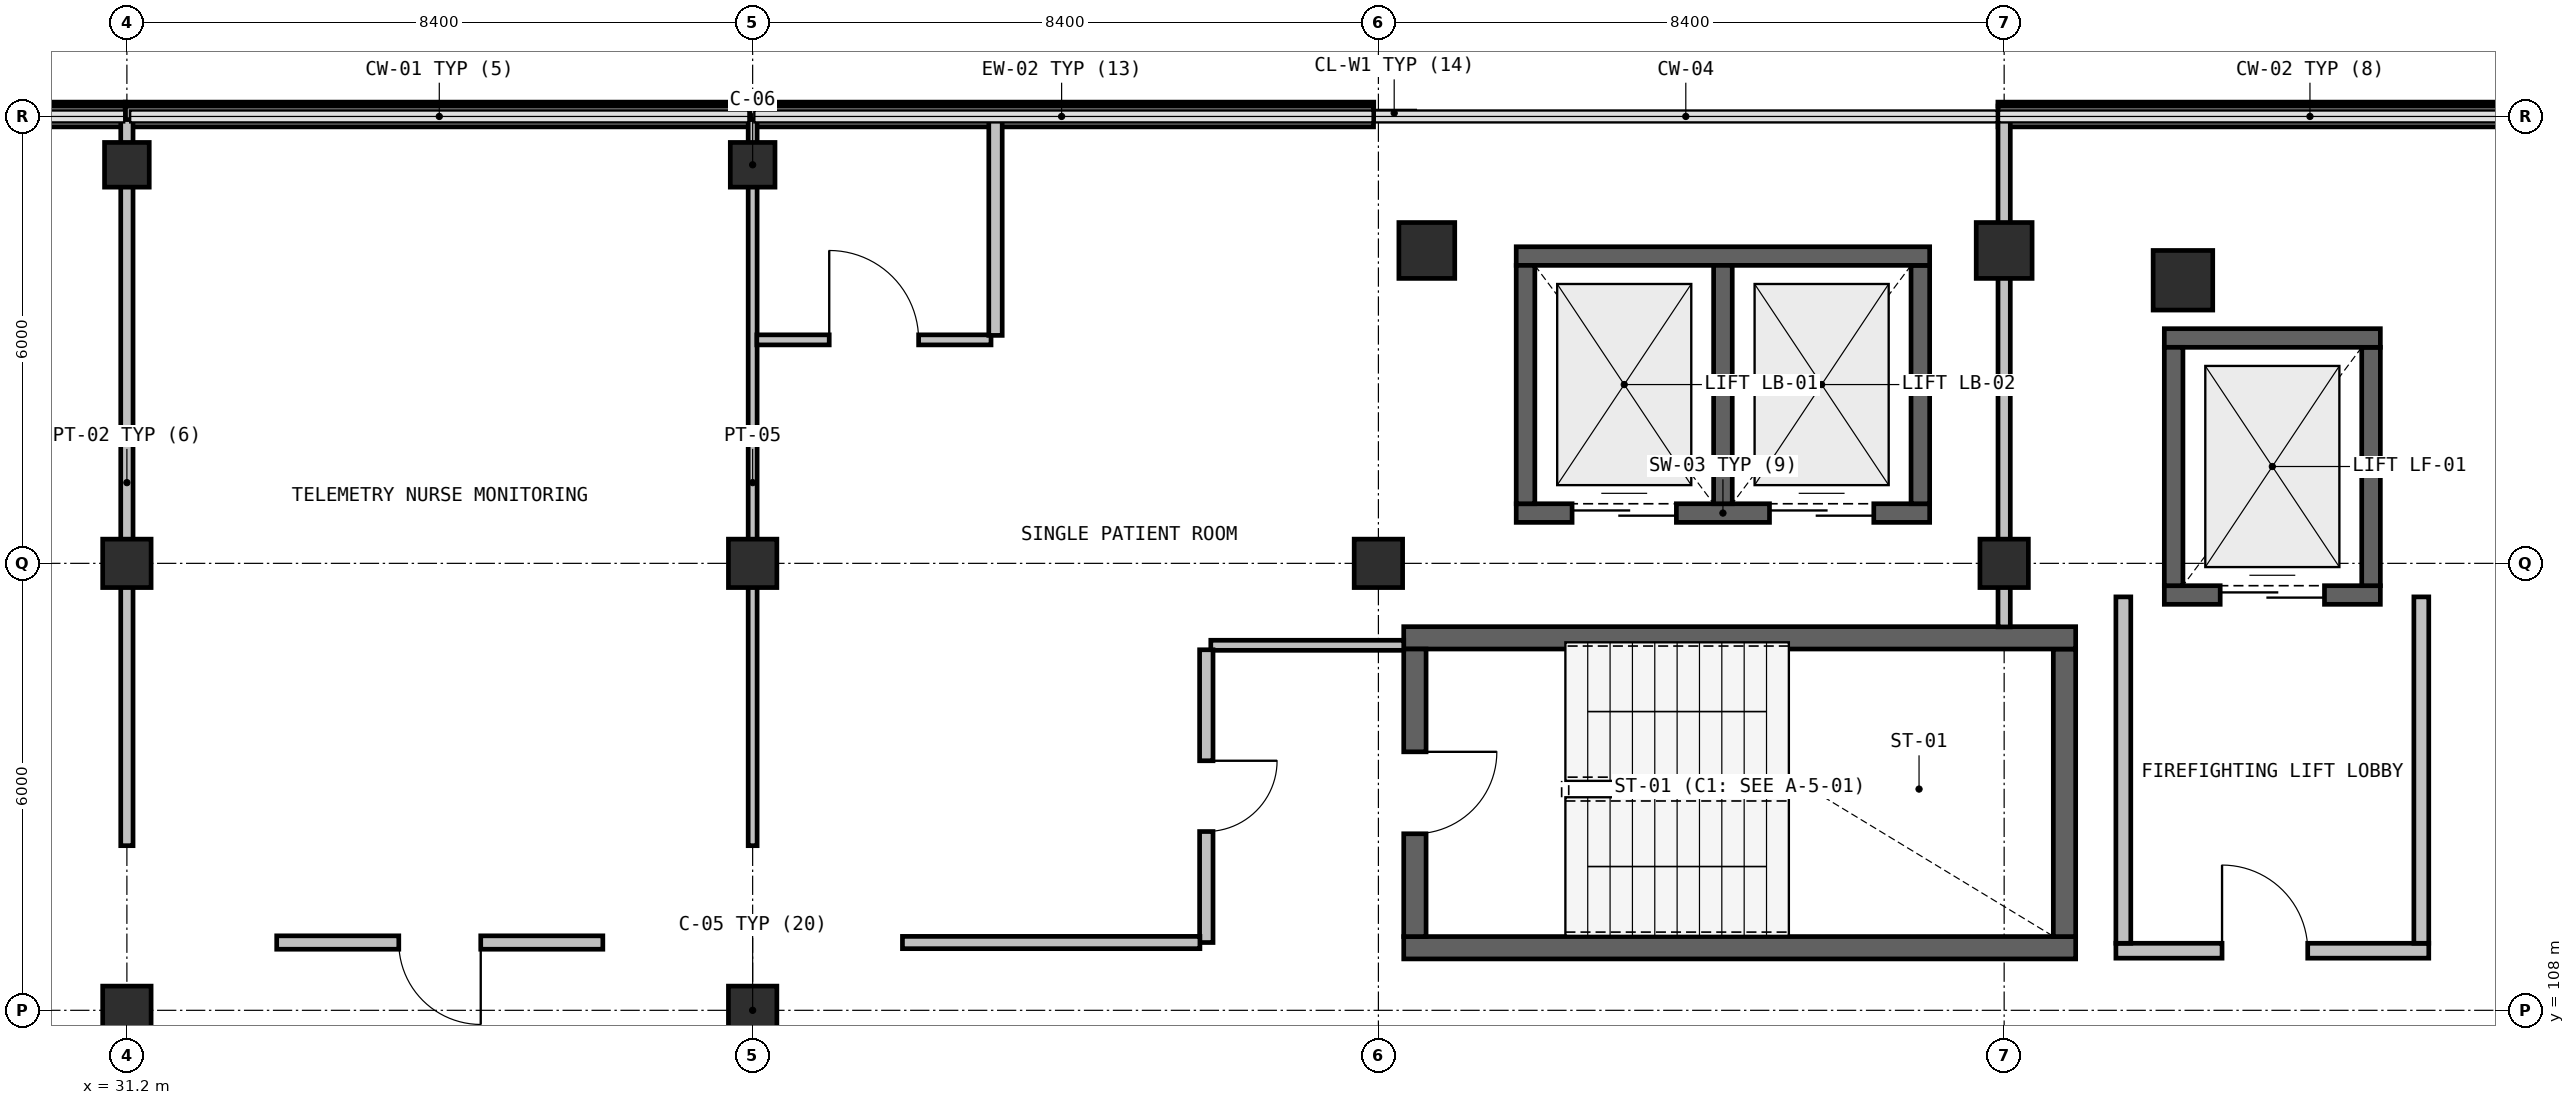
"""IFC4 building model, lengths in metres.
Left out: names, types, materials, properties, quantities, classifications, styles, units other than length and angle.
Written with IfcOpenShell. Run it as: python <this file> out.ifc"""

import sys

from ifc_helpers import new_model, si_unit, direction, frame, frame_2d, origin, origin_2d, place, context, subcontext, project, spatial, rectangle, extrude, element, fill, save


model = new_model("IFC4")
c1 = context("Model", 3, precision=1e-05, world=origin(), true_north=direction((0.0, 1.0)))
c2 = subcontext(c1, "Body", "Model", "MODEL_VIEW")
j1 = project(units=[si_unit("LENGTHUNIT", "METRE"), si_unit("PLANEANGLEUNIT", "RADIAN")], contexts=[c1])
p1 = place(None, origin())
s1 = spatial("IfcSite", under=j1, at=p1, CompositionType="ELEMENT")
p2 = place(p1, origin())
s2 = spatial("IfcBuilding", under=s1, at=p2, CompositionType="ELEMENT")
p3 = place(p2, frame((0.0, 0.0, 27.3)))
s3 = spatial("IfcBuildingStorey", under=s2, at=p3, CompositionType="ELEMENT", Elevation=27.3)
p4 = place(p3, frame((58.8, 117.8, 0.0), z_axis=(0.0, 0.0, 1.0), x_axis=(1.0, 0.0, 0.0)))
e1 = element("IfcColumn", 1, at=p4, inside=s3, PredefinedType="COLUMN", context=c2, shape_type="SweptSolid", body=[
    extrude(rectangle(XDim=0.8, YDim=0.8, at=origin_2d()), origin(), (0.0, 0.0, 1.0), 4.05),
])
for number, where, z_axis, x_axis in (
    (2, (48.65, 118.2, 0.0), (0.0, 0.0, 1.0), (1.0, 0.0, 0.0)),
    (3, (56.4, 118.2, 0.0), (0.0, 0.0, 1.0), (1.0, 0.0, 0.0)),
):
    element("IfcColumn", number, at=place(p3, frame(where, z_axis=z_axis, x_axis=x_axis)), inside=s3, PredefinedType="COLUMN", context=c2, shape_type="SweptSolid", body=[
        extrude(rectangle(XDim=0.75, YDim=0.75, at=origin_2d()), origin(), (0.0, 0.0, 1.0), 4.05),
    ])
for number, where, z_axis, x_axis in (
    (4, (31.2, 108.0, 0.0), (0.0, 0.0, 1.0), (1.0, 0.0, 0.0)),
    (5, (31.2, 114.0, 0.0), (0.0, 0.0, 1.0), (1.0, 0.0, 0.0)),
):
    element("IfcColumn", number, at=place(p3, frame(where, z_axis=z_axis, x_axis=x_axis)), inside=s3, PredefinedType="COLUMN", context=c2, shape_type="SweptSolid", body=[
        extrude(rectangle(XDim=0.65, YDim=0.65, at=origin_2d()), origin(), (0.0, 0.0, 1.0), 4.05),
    ])
p5 = place(p3, frame((31.2, 119.35, 0.0), z_axis=(0.0, 0.0, 1.0), x_axis=(1.0, 0.0, 0.0)))
e6 = element("IfcColumn", 6, at=p5, inside=s3, PredefinedType="COLUMN", context=c2, shape_type="SweptSolid", body=[
    extrude(rectangle(XDim=0.6, YDim=0.6, at=origin_2d()), origin(), (0.0, 0.0, 1.0), 4.05),
])
for number, where, z_axis, x_axis in (
    (7, (39.6, 108.0, 0.0), (0.0, 0.0, 1.0), (1.0, 0.0, 0.0)),
    (8, (39.6, 114.0, 0.0), (0.0, 0.0, 1.0), (1.0, 0.0, 0.0)),
):
    element("IfcColumn", number, at=place(p3, frame(where, z_axis=z_axis, x_axis=x_axis)), inside=s3, PredefinedType="COLUMN", context=c2, shape_type="SweptSolid", body=[
        extrude(rectangle(XDim=0.65, YDim=0.65, at=origin_2d()), origin(), (0.0, 0.0, 1.0), 4.05),
    ])
p6 = place(p3, frame((39.6, 119.35, 0.0), z_axis=(0.0, 0.0, 1.0), x_axis=(1.0, 0.0, 0.0)))
e9 = element("IfcColumn", 9, at=p6, inside=s3, PredefinedType="COLUMN", context=c2, shape_type="SweptSolid", body=[
    extrude(rectangle(XDim=0.6, YDim=0.6, at=origin_2d()), origin(), (0.0, 0.0, 1.0), 4.05),
])
for number, where, z_axis, x_axis in (
    (10, (48.0, 114.0, 0.0), (0.0, 0.0, 1.0), (1.0, 0.0, 0.0)),
    (11, (56.4, 114.0, 0.0), (0.0, 0.0, 1.0), (1.0, 0.0, 0.0)),
):
    element("IfcColumn", number, at=place(p3, frame(where, z_axis=z_axis, x_axis=x_axis)), inside=s3, PredefinedType="COLUMN", context=c2, shape_type="SweptSolid", body=[
        extrude(rectangle(XDim=0.65, YDim=0.65, at=origin_2d()), origin(), (0.0, 0.0, 1.0), 4.05),
    ])
p7 = place(p3, frame((22.94, 119.999, 0.0), z_axis=(0.0, 0.0, 1.0), x_axis=(1.0, 0.0, 0.0)))
e12 = element("IfcWall", 12, at=p7, inside=s3, PredefinedType="SOLIDWALL", context=c2, shape_type="SweptSolid", body=[
    extrude(rectangle(XDim=8.237, YDim=0.28, at=frame_2d((4.119, 0.0))), origin(), (0.0, 0.0, 1.0), 0.94),
])
for number, where, z_axis, x_axis in (
    (13, (31.181, 119.999, 0.0), (0.0, 0.0, 1.0), (1.0, 0.0, 0.0)),
    (14, (39.56, 119.999, 0.0), (0.0, 0.0, 1.0), (1.0, 0.0, 0.0)),
):
    element("IfcWall", number, at=place(p3, frame(where, z_axis=z_axis, x_axis=x_axis)), inside=s3, PredefinedType="SOLIDWALL", context=c2, shape_type="SweptSolid", body=[
        extrude(rectangle(XDim=8.375, YDim=0.28, at=frame_2d((4.188, 0.0))), origin(), (0.0, 0.0, 1.0), 0.94),
    ])
p8 = place(p3, frame((56.318, 119.999, 0.0), z_axis=(0.0, 0.0, 1.0), x_axis=(1.0, 0.0, 0.0)))
e15 = element("IfcWall", 15, at=p8, inside=s3, PredefinedType="SOLIDWALL", context=c2, shape_type="SweptSolid", body=[
    extrude(rectangle(XDim=8.374, YDim=0.28, at=frame_2d((4.187, 0.0))), origin(), (0.0, 0.0, 1.0), 0.94),
])
p9 = place(p3, frame((48.34, 108.84, 0.0), z_axis=(0.0, 0.0, 1.0), x_axis=(1.0, 0.0, 0.0)))
e16 = element("IfcWall", 16, at=p9, inside=s3, PredefinedType="SHEAR", context=c2, shape_type="SweptSolid", body=[
    extrude(rectangle(XDim=9.02, YDim=0.3, at=frame_2d((4.51, 0.0))), origin(), (0.0, 0.0, 1.0), 3.78),
])
p10 = place(p3, frame((57.21, 108.99, 0.0), z_axis=(0.0, 0.0, 1.0), x_axis=(0.0, 1.0, 0.0)))
e17 = element("IfcWall", 17, at=p10, inside=s3, PredefinedType="SHEAR", context=c2, shape_type="SweptSolid", body=[
    extrude(rectangle(XDim=3.86, YDim=0.3, at=frame_2d((1.93, 0.0))), origin(), (0.0, 0.0, 1.0), 3.78),
])
p11 = place(p3, frame((57.36, 113.0, 0.0), z_axis=(0.0, 0.0, 1.0), x_axis=(-1.0, 0.0, 0.0)))
e18 = element("IfcWall", 18, at=p11, inside=s3, PredefinedType="SHEAR", context=c2, shape_type="SweptSolid", body=[
    extrude(rectangle(XDim=9.02, YDim=0.3, at=frame_2d((4.51, 0.0))), origin(), (0.0, 0.0, 1.0), 3.78),
])
p12 = place(p3, frame((48.49, 112.85, 0.0), z_axis=(0.0, 0.0, 1.0), x_axis=(0.0, -1.0, 0.0)))
e19 = element("IfcWall", 19, at=p12, inside=s3, PredefinedType="SHEAR", context=c2, shape_type="SweptSolid", body=[
    extrude(rectangle(XDim=3.86, YDim=0.3, at=frame_2d((1.93, 0.0))), origin(), (0.0, 0.0, 1.0), 3.78),
])
p13 = place(p12, frame((1.38, 0.0, 0.0)))
e20 = element("IfcOpeningElement", 20, at=p13, cuts=e19, PredefinedType="OPENING", context=c2, shape_type="SweptSolid", body=[
    extrude(rectangle(XDim=1.1, YDim=2.15, at=frame_2d((0.55, 1.075))), frame((0.0, 0.16, 0.0), z_axis=(0.0, -1.0, 0.0), x_axis=(1.0, 0.0, 0.0)), (0.0, 0.0, 1.0), 0.32),
])
p14 = place(p3, frame((57.9, 108.8, 0.0), z_axis=(0.0, 0.0, 1.0), x_axis=(1.0, 0.0, 0.0)))
e21 = element("IfcWall", 21, at=p14, inside=s3, PredefinedType="SOLIDWALL", context=c2, shape_type="SweptSolid", body=[
    extrude(rectangle(XDim=4.2, YDim=0.2, at=frame_2d((2.1, 0.0))), origin(), (0.0, 0.0, 1.0), 3.78),
])
p15 = place(p14, frame((1.425, 0.0, 0.0)))
e22 = element("IfcOpeningElement", 22, at=p15, cuts=e21, PredefinedType="OPENING", context=c2, shape_type="SweptSolid", body=[
    extrude(rectangle(XDim=1.15, YDim=2.15, at=frame_2d((0.575, 1.075))), frame((0.0, 0.11, 0.0), z_axis=(0.0, -1.0, 0.0), x_axis=(1.0, 0.0, 0.0)), (0.0, 0.0, 1.0), 0.22),
])
for number, where, z_axis, x_axis in (
    (23, (62.0, 108.9, 0.0), (0.0, 0.0, 1.0), (0.0, 1.0, 0.0)),
    (24, (58.0, 113.55, 0.0), (0.0, 0.0, 1.0), (0.0, -1.0, 0.0)),
):
    element("IfcWall", number, at=place(p3, frame(where, z_axis=z_axis, x_axis=x_axis)), inside=s3, PredefinedType="SOLIDWALL", context=c2, shape_type="SweptSolid", body=[
        extrude(rectangle(XDim=4.65, YDim=0.2, at=frame_2d((2.325, 0.0))), origin(), (0.0, 0.0, 1.0), 3.78),
    ])
p16 = place(p3, frame((58.55, 113.575, 0.0), z_axis=(0.0, 0.0, 1.0), x_axis=(1.0, 0.0, 0.0)))
e25 = element("IfcWall", 25, at=p16, inside=s3, PredefinedType="SHEAR", context=c2, shape_type="SweptSolid", body=[
    extrude(rectangle(XDim=2.9, YDim=0.25, at=frame_2d((1.45, 0.0))), origin(), (0.0, 0.0, 1.0), 3.78),
])
p17 = place(p16, frame((0.75, 0.0, 0.0)))
e26 = element("IfcOpeningElement", 26, at=p17, cuts=e25, PredefinedType="OPENING", context=c2, shape_type="SweptSolid", body=[
    extrude(rectangle(XDim=1.4, YDim=2.15, at=frame_2d((0.7, 1.075))), frame((0.0, 0.135, 0.0), z_axis=(0.0, -1.0, 0.0), x_axis=(1.0, 0.0, 0.0)), (0.0, 0.0, 1.0), 0.27),
])
p18 = place(p3, frame((61.325, 113.7, 0.0), z_axis=(0.0, 0.0, 1.0), x_axis=(0.0, 1.0, 0.0)))
e27 = element("IfcWall", 27, at=p18, inside=s3, PredefinedType="SHEAR", context=c2, shape_type="SweptSolid", body=[
    extrude(rectangle(XDim=3.2, YDim=0.25, at=frame_2d((1.6, 0.0))), origin(), (0.0, 0.0, 1.0), 3.78),
])
p19 = place(p3, frame((61.45, 117.025, 0.0), z_axis=(0.0, 0.0, 1.0), x_axis=(-1.0, 0.0, 0.0)))
e28 = element("IfcWall", 28, at=p19, inside=s3, PredefinedType="SHEAR", context=c2, shape_type="SweptSolid", body=[
    extrude(rectangle(XDim=2.9, YDim=0.25, at=frame_2d((1.45, 0.0))), origin(), (0.0, 0.0, 1.0), 3.78),
])
p20 = place(p3, frame((58.675, 116.9, 0.0), z_axis=(0.0, 0.0, 1.0), x_axis=(0.0, -1.0, 0.0)))
e29 = element("IfcWall", 29, at=p20, inside=s3, PredefinedType="SHEAR", context=c2, shape_type="SweptSolid", body=[
    extrude(rectangle(XDim=3.2, YDim=0.25, at=frame_2d((1.6, 0.0))), origin(), (0.0, 0.0, 1.0), 3.78),
])
p21 = place(p3, frame((49.85, 114.675, 0.0), z_axis=(0.0, 0.0, 1.0), x_axis=(1.0, 0.0, 0.0)))
e30 = element("IfcWall", 30, at=p21, inside=s3, PredefinedType="SHEAR", context=c2, shape_type="SweptSolid", body=[
    extrude(rectangle(XDim=5.55, YDim=0.25, at=frame_2d((2.775, 0.0))), origin(), (0.0, 0.0, 1.0), 3.78),
])
p22 = place(p21, frame((0.75, 0.0, 0.0)))
e31 = element("IfcOpeningElement", 31, at=p22, cuts=e30, PredefinedType="OPENING", context=c2, shape_type="SweptSolid", body=[
    extrude(rectangle(XDim=1.4, YDim=2.2, at=frame_2d((0.7, 1.1))), frame((0.0, 0.135, 0.0), z_axis=(0.0, -1.0, 0.0), x_axis=(1.0, 0.0, 0.0)), (0.0, 0.0, 1.0), 0.27),
])
p23 = place(p21, frame((3.4, 0.0, 0.0)))
e32 = element("IfcOpeningElement", 32, at=p23, cuts=e30, PredefinedType="OPENING", context=c2, shape_type="SweptSolid", body=[
    extrude(rectangle(XDim=1.4, YDim=2.2, at=frame_2d((0.7, 1.1))), frame((0.0, 0.135, 0.0), z_axis=(0.0, -1.0, 0.0), x_axis=(1.0, 0.0, 0.0)), (0.0, 0.0, 1.0), 0.27),
])
p24 = place(p3, frame((55.275, 114.8, 0.0), z_axis=(0.0, 0.0, 1.0), x_axis=(0.0, 1.0, 0.0)))
e33 = element("IfcWall", 33, at=p24, inside=s3, PredefinedType="SHEAR", context=c2, shape_type="SweptSolid", body=[
    extrude(rectangle(XDim=3.2, YDim=0.25, at=frame_2d((1.6, 0.0))), origin(), (0.0, 0.0, 1.0), 3.78),
])
p25 = place(p3, frame((55.4, 118.125, 0.0), z_axis=(0.0, 0.0, 1.0), x_axis=(-1.0, 0.0, 0.0)))
e34 = element("IfcWall", 34, at=p25, inside=s3, PredefinedType="SHEAR", context=c2, shape_type="SweptSolid", body=[
    extrude(rectangle(XDim=5.55, YDim=0.25, at=frame_2d((2.775, 0.0))), origin(), (0.0, 0.0, 1.0), 3.78),
])
for number, where, z_axis, x_axis in (
    (35, (49.975, 118.0, 0.0), (0.0, 0.0, 1.0), (0.0, -1.0, 0.0)),
    (36, (52.625, 114.8, 0.0), (0.0, 0.0, 1.0), (0.0, 1.0, 0.0)),
):
    element("IfcWall", number, at=place(p3, frame(where, z_axis=z_axis, x_axis=x_axis)), inside=s3, PredefinedType="SHEAR", context=c2, shape_type="SweptSolid", body=[
        extrude(rectangle(XDim=3.2, YDim=0.25, at=frame_2d((1.6, 0.0))), origin(), (0.0, 0.0, 1.0), 3.78),
    ])
p26 = place(p3, frame((31.2, 119.957, 0.0), z_axis=(0.0, 0.0, 1.0), x_axis=(0.0, -1.0, 0.0)))
e37 = element("IfcWall", 37, at=p26, inside=s3, PredefinedType="PARTITIONING", context=c2, shape_type="SweptSolid", body=[
    extrude(rectangle(XDim=9.747, YDim=0.165, at=frame_2d((4.874, 0.0))), origin(), (0.0, 0.0, 1.0), 3.18),
])
p27 = place(p3, frame((39.6, 119.957, 0.0), z_axis=(0.0, 0.0, 1.0), x_axis=(0.0, -1.0, 0.0)))
e38 = element("IfcWall", 38, at=p27, inside=s3, PredefinedType="PARTITIONING", context=c2, shape_type="SweptSolid", body=[
    extrude(rectangle(XDim=9.747, YDim=0.12, at=frame_2d((4.874, 0.0))), origin(), (0.0, 0.0, 1.0), 3.18),
])
p28 = place(p3, frame((37.589, 108.91, 0.0), z_axis=(0.0, 0.0, 1.0), x_axis=(-1.0, 0.0, 0.0)))
e39 = element("IfcWall", 39, at=p28, inside=s3, PredefinedType="PARTITIONING", context=c2, shape_type="SweptSolid", body=[
    extrude(rectangle(XDim=4.378, YDim=0.18, at=frame_2d((2.189, 0.0))), origin(), (0.0, 0.0, 1.0), 3.78),
])
p29 = place(p28, frame((1.639, 0.0, 0.0)))
e40 = element("IfcOpeningElement", 40, at=p29, cuts=e39, PredefinedType="OPENING", context=c2, shape_type="SweptSolid", body=[
    extrude(rectangle(XDim=1.1, YDim=2.15, at=frame_2d((0.55, 1.075))), frame((0.0, 0.1, 0.0), z_axis=(0.0, -1.0, 0.0), x_axis=(1.0, 0.0, 0.0)), (0.0, 0.0, 1.0), 0.2),
])
p30 = place(p3, frame((48.34, 112.9, 0.0), z_axis=(0.0, 0.0, 1.0), x_axis=(-1.0, 0.0, 0.0)))
e41 = element("IfcWall", 41, at=p30, inside=s3, PredefinedType="PARTITIONING", context=c2, shape_type="SweptSolid", body=[
    extrude(rectangle(XDim=2.59, YDim=0.135, at=frame_2d((1.295, 0.0))), origin(), (0.0, 0.0, 1.0), 3.78),
])
p31 = place(p3, frame((45.69, 112.84, 0.0), z_axis=(0.0, 0.0, 1.0), x_axis=(0.0, -1.0, 0.0)))
e42 = element("IfcWall", 42, at=p31, inside=s3, PredefinedType="PARTITIONING", context=c2, shape_type="SweptSolid", body=[
    extrude(rectangle(XDim=3.93, YDim=0.18, at=frame_2d((1.965, 0.0))), origin(), (0.0, 0.0, 1.0), 3.78),
])
p32 = place(p31, frame((1.49, 0.0, 0.0)))
e43 = element("IfcOpeningElement", 43, at=p32, cuts=e42, PredefinedType="OPENING", context=c2, shape_type="SweptSolid", body=[
    extrude(rectangle(XDim=0.95, YDim=2.1, at=frame_2d((0.475, 1.05))), frame((0.0, 0.1, 0.0), z_axis=(0.0, -1.0, 0.0), x_axis=(1.0, 0.0, 0.0)), (0.0, 0.0, 1.0), 0.2),
])
p33 = place(p3, frame((45.604, 108.91, 0.0), z_axis=(0.0, 0.0, 1.0), x_axis=(-1.0, 0.0, 0.0)))
e44 = element("IfcWall", 44, at=p33, inside=s3, PredefinedType="PARTITIONING", context=c2, shape_type="SweptSolid", body=[
    extrude(rectangle(XDim=3.993, YDim=0.165, at=frame_2d((1.997, 0.0))), origin(), (0.0, 0.0, 1.0), 3.78),
])
p34 = place(p3, frame((39.656, 117.0, 0.0), z_axis=(0.0, 0.0, 1.0), x_axis=(1.0, 0.0, 0.0)))
e45 = element("IfcWall", 45, at=p34, inside=s3, PredefinedType="PARTITIONING", context=c2, shape_type="SweptSolid", body=[
    extrude(rectangle(XDim=3.144, YDim=0.135, at=frame_2d((1.572, 0.0))), origin(), (0.0, 0.0, 1.0), 3.78),
])
p35 = place(p34, frame((0.972, 0.0, 0.0)))
e46 = element("IfcOpeningElement", 46, at=p35, cuts=e45, PredefinedType="OPENING", context=c2, shape_type="SweptSolid", body=[
    extrude(rectangle(XDim=1.2, YDim=2.15, at=frame_2d((0.6, 1.075))), frame((0.0, 0.077, 0.0), z_axis=(0.0, -1.0, 0.0), x_axis=(1.0, 0.0, 0.0)), (0.0, 0.0, 1.0), 0.155),
])
p36 = place(p3, frame((42.86, 117.06, 0.0), z_axis=(0.0, 0.0, 1.0), x_axis=(0.0, 1.0, 0.0)))
e47 = element("IfcWall", 47, at=p36, inside=s3, PredefinedType="PARTITIONING", context=c2, shape_type="SweptSolid", body=[
    extrude(rectangle(XDim=2.897, YDim=0.18, at=frame_2d((1.448, 0.0))), origin(), (0.0, 0.0, 1.0), 3.78),
])
p37 = place(p3, frame((56.4, 119.957, 0.0), z_axis=(0.0, 0.0, 1.0), x_axis=(0.0, -1.0, 0.0)))
e48 = element("IfcWall", 48, at=p37, inside=s3, PredefinedType="PARTITIONING", context=c2, shape_type="SweptSolid", body=[
    extrude(rectangle(XDim=6.81, YDim=0.165, at=frame_2d((3.405, 0.0))), origin(), (0.0, 0.0, 1.0), 3.18),
])
p38 = place(p13, origin())
e49 = element("IfcDoor", 49, at=p38, inside=s3, OperationType="SINGLE_SWING_RIGHT", PredefinedType="DOOR", context=c2, shape_type="SweptSolid", body=[
    extrude(rectangle(XDim=1.1, YDim=2.15, at=frame_2d((0.55, 1.075))), frame((0.0, 0.025, 0.0), z_axis=(0.0, -1.0, 0.0), x_axis=(1.0, 0.0, 0.0)), (0.0, 0.0, 1.0), 0.05),
])
fill(e20, e49)
p39 = place(p15, origin())
e50 = element("IfcDoor", 50, at=p39, inside=s3, OperationType="SINGLE_SWING_LEFT", PredefinedType="DOOR", context=c2, shape_type="SweptSolid", body=[
    extrude(rectangle(XDim=1.15, YDim=2.15, at=frame_2d((0.575, 1.075))), frame((0.0, 0.025, 0.0), z_axis=(0.0, -1.0, 0.0), x_axis=(1.0, 0.0, 0.0)), (0.0, 0.0, 1.0), 0.05),
])
fill(e22, e50)
p40 = place(p17, origin())
e51 = element("IfcDoor", 51, at=p40, inside=s3, OperationType="DOUBLE_DOOR_SLIDING", PredefinedType="DOOR", context=c2, shape_type="SweptSolid", body=[
    extrude(rectangle(XDim=1.4, YDim=2.15, at=frame_2d((0.7, 1.075))), frame((0.0, 0.025, 0.0), z_axis=(0.0, -1.0, 0.0), x_axis=(1.0, 0.0, 0.0)), (0.0, 0.0, 1.0), 0.05),
])
fill(e26, e51)
p41 = place(p22, origin())
e52 = element("IfcDoor", 52, at=p41, inside=s3, OperationType="DOUBLE_DOOR_SLIDING", PredefinedType="DOOR", context=c2, shape_type="SweptSolid", body=[
    extrude(rectangle(XDim=1.4, YDim=2.2, at=frame_2d((0.7, 1.1))), frame((0.0, 0.025, 0.0), z_axis=(0.0, -1.0, 0.0), x_axis=(1.0, 0.0, 0.0)), (0.0, 0.0, 1.0), 0.05),
])
fill(e31, e52)
p42 = place(p23, origin())
e53 = element("IfcDoor", 53, at=p42, inside=s3, OperationType="DOUBLE_DOOR_SLIDING", PredefinedType="DOOR", context=c2, shape_type="SweptSolid", body=[
    extrude(rectangle(XDim=1.4, YDim=2.2, at=frame_2d((0.7, 1.1))), frame((0.0, 0.025, 0.0), z_axis=(0.0, -1.0, 0.0), x_axis=(1.0, 0.0, 0.0)), (0.0, 0.0, 1.0), 0.05),
])
fill(e32, e53)
p43 = place(p29, origin())
e54 = element("IfcDoor", 54, at=p43, inside=s3, OperationType="SINGLE_SWING_RIGHT", PredefinedType="DOOR", context=c2, shape_type="SweptSolid", body=[
    extrude(rectangle(XDim=1.1, YDim=2.15, at=frame_2d((0.55, 1.075))), frame((0.0, 0.025, 0.0), z_axis=(0.0, -1.0, 0.0), x_axis=(1.0, 0.0, 0.0)), (0.0, 0.0, 1.0), 0.05),
])
fill(e40, e54)
p44 = place(p32, origin())
e55 = element("IfcDoor", 55, at=p44, inside=s3, OperationType="SINGLE_SWING_LEFT", PredefinedType="DOOR", context=c2, shape_type="SweptSolid", body=[
    extrude(rectangle(XDim=0.95, YDim=2.1, at=frame_2d((0.475, 1.05))), frame((0.0, 0.025, 0.0), z_axis=(0.0, -1.0, 0.0), x_axis=(1.0, 0.0, 0.0)), (0.0, 0.0, 1.0), 0.05),
])
fill(e43, e55)
p45 = place(p35, origin())
e56 = element("IfcDoor", 56, at=p45, inside=s3, OperationType="SINGLE_SWING_RIGHT", PredefinedType="DOOR", context=c2, shape_type="SweptSolid", body=[
    extrude(rectangle(XDim=1.2, YDim=2.15, at=frame_2d((0.6, 1.075))), frame((0.0, 0.025, 0.0), z_axis=(0.0, -1.0, 0.0), x_axis=(1.0, 0.0, 0.0)), (0.0, 0.0, 1.0), 0.05),
])
fill(e46, e56)
save(model, sys.argv[1])
